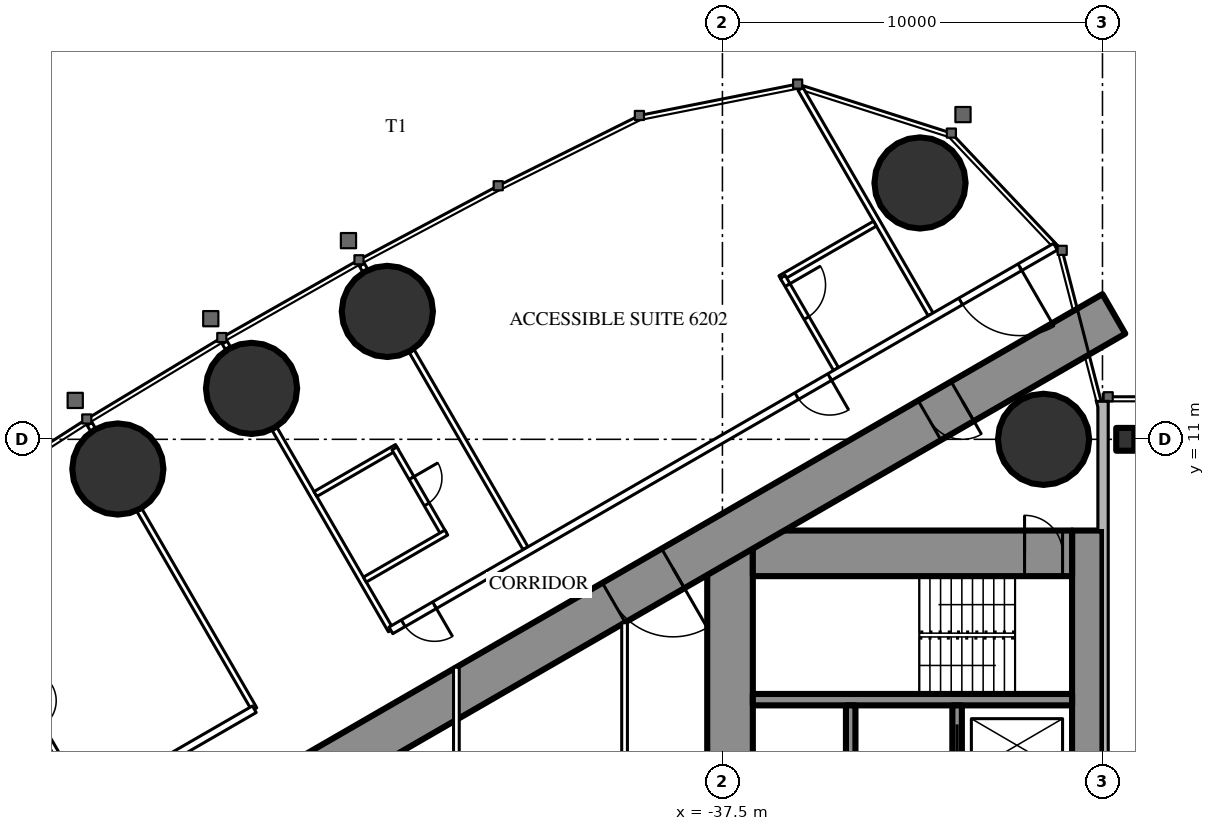
"""IFC4 building model, lengths in metres.
Left out: names, types, materials, properties, quantities, classifications, styles, units other than length and angle.
Written with IfcOpenShell. Run it as: python <this file> out.ifc"""

import sys

from ifc_helpers import new_model, si_unit, direction, frame, frame_2d, origin, origin_2d, place, context, subcontext, project, spatial, rectangle, circle, i_section, extrude, element, fill, save


model = new_model("IFC4")
c1 = context("Model", 3, precision=1e-05, world=origin(), true_north=direction((0.0, 1.0)))
c2 = subcontext(c1, "Body", "Model", "MODEL_VIEW")
j1 = project(units=[si_unit("LENGTHUNIT", "METRE"), si_unit("PLANEANGLEUNIT", "RADIAN")], contexts=[c1])
p1 = place(None, origin())
s1 = spatial("IfcSite", under=j1, at=p1, CompositionType="ELEMENT")
p2 = place(p1, origin())
s2 = spatial("IfcBuilding", under=s1, at=p2, CompositionType="ELEMENT")
p3 = place(p2, frame((0.0, 0.0, 233.3)))
s3 = spatial("IfcBuildingStorey", under=s2, at=p3, CompositionType="ELEMENT", Elevation=233.3)
for number, where, z_axis, x_axis in (
    (1, (-32.301, 17.745, 0.0), (0.0, 0.0, 1.0), (1.0, 0.0, 0.0)),
    (2, (-29.05, 11.0, 0.0), (0.0, 0.0, 1.0), (1.0, 0.0, 0.0)),
    (3, (-46.317, 14.365, 0.0), (0.0, 0.0, 1.0), (1.0, 0.0, 0.0)),
    (4, (-49.89, 12.34, 0.0), (0.0, 0.0, 1.0), (1.0, 0.0, 0.0)),
    (5, (-53.408, 10.219, 0.0), (0.0, 0.0, 1.0), (1.0, 0.0, 0.0)),
):
    element("IfcColumn", number, at=place(p3, frame(where, z_axis=z_axis, x_axis=x_axis)), inside=s3, PredefinedType="COLUMN", context=c2, shape_type="SweptSolid", body=[
        extrude(circle(Radius=1.2, at=origin_2d()), origin(), (0.0, 0.0, 1.0), 3.6),
    ])
p4 = place(p3, frame((-27.9, 8.6, 0.0), z_axis=(0.0, 0.0, 1.0), x_axis=(0.0, -1.0, 0.0)))
e6 = element("IfcWall", 6, at=p4, inside=s3, PredefinedType="SHEAR", context=c2, shape_type="SweptSolid", body=[
    extrude(rectangle(XDim=17.2, YDim=0.8, at=frame_2d((8.6, 0.0))), origin(), (0.0, 0.0, 1.0), 3.6),
])
p5 = place(p4, frame((6.95, 0.0, 0.0)))
e7 = element("IfcOpeningElement", 7, at=p5, cuts=e6, PredefinedType="OPENING", context=c2, shape_type="SweptSolid", body=[
    extrude(rectangle(XDim=0.9, YDim=2.2, at=frame_2d((0.45, 1.1))), frame((0.0, 0.41, 0.0), z_axis=(0.0, -1.0, 0.0), x_axis=(1.0, 0.0, 0.0)), (0.0, 0.0, 1.0), 0.82),
])
p6 = place(p3, frame((-37.3, 8.6, 0.0), z_axis=(0.0, 0.0, 1.0), x_axis=(0.0, -1.0, 0.0)))
e8 = element("IfcWall", 8, at=p6, inside=s3, PredefinedType="SHEAR", context=c2, shape_type="SweptSolid", body=[
    extrude(rectangle(XDim=17.2, YDim=1.2, at=frame_2d((8.6, 0.0))), origin(), (0.0, 0.0, 1.0), 3.6),
])
p7 = place(p6, frame((7.7, 0.0, 0.0)))
e9 = element("IfcOpeningElement", 9, at=p7, cuts=e8, PredefinedType="OPENING", context=c2, shape_type="SweptSolid", body=[
    extrude(rectangle(XDim=1.8, YDim=2.2, at=frame_2d((0.9, 1.1))), frame((0.0, 0.61, 0.0), z_axis=(0.0, -1.0, 0.0), x_axis=(1.0, 0.0, 0.0)), (0.0, 0.0, 1.0), 1.22),
])
p8 = place(p3, frame((-28.3, 8.0, 0.0), z_axis=(0.0, 0.0, 1.0), x_axis=(-1.0, 0.0, 0.0)))
e10 = element("IfcWall", 10, at=p8, inside=s3, PredefinedType="SHEAR", context=c2, shape_type="SweptSolid", body=[
    extrude(rectangle(XDim=8.4, YDim=1.2, at=frame_2d((4.2, 0.0))), origin(), (0.0, 0.0, 1.0), 3.6),
])
p9 = place(p8, frame((0.25, 0.0, 0.0)))
e11 = element("IfcOpeningElement", 11, at=p9, cuts=e10, PredefinedType="OPENING", context=c2, shape_type="SweptSolid", body=[
    extrude(rectangle(XDim=1.0, YDim=2.2, at=frame_2d((0.5, 1.1))), frame((0.0, 0.61, 0.0), z_axis=(0.0, -1.0, 0.0), x_axis=(1.0, 0.0, 0.0)), (0.0, 0.0, 1.0), 1.22),
])
p10 = place(p3, frame((-28.3, 4.15, 0.0), z_axis=(0.0, 0.0, 1.0), x_axis=(-1.0, 0.0, 0.0)))
e12 = element("IfcWall", 12, at=p10, inside=s3, PredefinedType="SHEAR", context=c2, shape_type="SweptSolid", body=[
    extrude(rectangle(XDim=8.4, YDim=0.3, at=frame_2d((4.2, 0.0))), origin(), (0.0, 0.0, 1.0), 3.6),
])
p11 = place(p3, frame((-31.325, 4.0, 0.0), z_axis=(0.0, 0.0, 1.0), x_axis=(0.0, -1.0, 0.0)))
e13 = element("IfcWall", 13, at=p11, inside=s3, PredefinedType="SHEAR", context=c2, shape_type="SweptSolid", body=[
    extrude(rectangle(XDim=2.1, YDim=0.25, at=frame_2d((1.05, 0.0))), origin(), (0.0, 0.0, 1.0), 3.6),
])
p12 = place(p11, frame((0.5, 0.0, 0.0)))
e14 = element("IfcOpeningElement", 14, at=p12, cuts=e13, PredefinedType="OPENING", context=c2, shape_type="SweptSolid", body=[
    extrude(rectangle(XDim=1.1, YDim=2.2, at=frame_2d((0.55, 1.1))), frame((0.0, 0.135, 0.0), z_axis=(0.0, -1.0, 0.0), x_axis=(1.0, 0.0, 0.0)), (0.0, 0.0, 1.0), 0.27),
])
p13 = place(p3, frame((-34.125, 4.0, 0.0), z_axis=(0.0, 0.0, 1.0), x_axis=(0.0, -1.0, 0.0)))
e15 = element("IfcWall", 15, at=p13, inside=s3, PredefinedType="SHEAR", context=c2, shape_type="SweptSolid", body=[
    extrude(rectangle(XDim=2.35, YDim=0.25, at=frame_2d((1.175, 0.0))), origin(), (0.0, 0.0, 1.0), 3.6),
])
p14 = place(p3, frame((-27.2, 14.3, 0.0), z_axis=(0.0, 0.0, 1.0), x_axis=(-0.866026593062, -0.499997940104, 0.0)))
e16 = element("IfcWall", 16, at=p14, inside=s3, PredefinedType="SHEAR", context=c2, shape_type="SweptSolid", body=[
    extrude(rectangle(XDim=28.946, YDim=1.2, at=frame_2d((14.473, 0.0))), origin(), (0.0, 0.0, 1.0), 3.6),
])
p15 = place(p14, frame((4.6, 0.0, 0.0)))
e17 = element("IfcOpeningElement", 17, at=p15, cuts=e16, PredefinedType="OPENING", context=c2, shape_type="SweptSolid", body=[
    extrude(rectangle(XDim=1.0, YDim=2.2, at=frame_2d((0.5, 1.1))), frame((0.0, 0.61, 0.0), z_axis=(0.0, -1.0, 0.0), x_axis=(1.0, 0.0, 0.0)), (0.0, 0.0, 1.0), 1.22),
])
p16 = place(p14, frame((13.395, 0.0, 0.0)))
e18 = element("IfcOpeningElement", 18, at=p16, cuts=e16, PredefinedType="OPENING", context=c2, shape_type="SweptSolid", body=[
    extrude(rectangle(XDim=1.8, YDim=2.2, at=frame_2d((0.9, 1.1))), frame((0.0, 0.61, 0.0), z_axis=(0.0, -1.0, 0.0), x_axis=(1.0, 0.0, 0.0)), (0.0, 0.0, 1.0), 1.22),
])
p17 = place(p3, frame((-26.9, 11.0, 0.0), z_axis=(0.0, 0.0, 1.0), x_axis=(1.0, 0.0, 0.0)))
e19 = element("IfcColumn", 19, at=p17, inside=s3, PredefinedType="COLUMN", context=c2, shape_type="SweptSolid", body=[
    extrude(i_section(OverallWidth=0.476, OverallDepth=0.6, WebThickness=0.1, FlangeThickness=0.14, FilletRadius=0.02, at=origin_2d()), origin(), (0.0, 0.0, 1.0), 3.6),
])
p18 = place(p3, frame((-32.022, 14.287, 0.0), z_axis=(0.0, 0.0, 1.0), x_axis=(-0.50000019414, 0.866025291697, 0.0)))
e20 = element("IfcWall", 20, at=p18, inside=s3, PredefinedType="PARTITIONING", context=c2, shape_type="SweptSolid", body=[
    extrude(rectangle(XDim=6.848, YDim=0.15, at=frame_2d((3.424, 0.0))), origin(), (0.0, 0.0, 1.0), 3.35),
])
p19 = place(p3, frame((-42.68, 8.134, 0.0), z_axis=(0.0, 0.0, 1.0), x_axis=(-0.499984479505, 0.866034364361, 0.0)))
e21 = element("IfcWall", 21, at=p19, inside=s3, PredefinedType="PARTITIONING", context=c2, shape_type="SweptSolid", body=[
    extrude(rectangle(XDim=5.995, YDim=0.15, at=frame_2d((2.998, 0.0))), origin(), (0.0, 0.0, 1.0), 2.45),
])
p20 = place(p3, frame((-46.898, 15.439, 0.0), z_axis=(0.0, 0.0, 1.0), x_axis=(-0.500232303069, 0.865891241997, 0.0)))
e22 = element("IfcWall", 22, at=p20, inside=s3, PredefinedType="PARTITIONING", context=c2, shape_type="SweptSolid", body=[
    extrude(rectangle(XDim=0.18, YDim=0.15, at=frame_2d((0.09, 0.0))), origin(), (0.0, 0.0, 1.0), 2.45),
])
p21 = place(p3, frame((-46.224, 5.972, 0.0), z_axis=(0.0, 0.0, 1.0), x_axis=(-0.500021351822, 0.866013075953, 0.0)))
e23 = element("IfcWall", 23, at=p21, inside=s3, PredefinedType="PARTITIONING", context=c2, shape_type="SweptSolid", body=[
    extrude(rectangle(XDim=6.128, YDim=0.15, at=frame_2d((3.064, 0.0))), origin(), (0.0, 0.0, 1.0), 2.45),
])
p22 = place(p3, frame((-50.508, 13.392, 0.0), z_axis=(0.0, 0.0, 1.0), x_axis=(-0.499644091975, 0.866230789891, 0.0)))
e24 = element("IfcWall", 24, at=p22, inside=s3, PredefinedType="PARTITIONING", context=c2, shape_type="SweptSolid", body=[
    extrude(rectangle(XDim=0.18, YDim=0.15, at=frame_2d((0.09, 0.0))), origin(), (0.0, 0.0, 1.0), 2.45),
])
p23 = place(p3, frame((-49.816, 3.898, 0.0), z_axis=(0.0, 0.0, 1.0), x_axis=(-0.500001913541, 0.866024298998, 0.0)))
e25 = element("IfcWall", 25, at=p23, inside=s3, PredefinedType="PARTITIONING", context=c2, shape_type="SweptSolid", body=[
    extrude(rectangle(XDim=6.05, YDim=0.15, at=frame_2d((3.025, 0.0))), origin(), (0.0, 0.0, 1.0), 2.45),
])
p24 = place(p3, frame((-54.061, 11.25, 0.0), z_axis=(0.0, 0.0, 1.0), x_axis=(-0.500391173478, 0.865799441849, 0.0)))
e26 = element("IfcWall", 26, at=p24, inside=s3, PredefinedType="PARTITIONING", context=c2, shape_type="SweptSolid", body=[
    extrude(rectangle(XDim=0.179, YDim=0.15, at=frame_2d((0.089, 0.0))), origin(), (0.0, 0.0, 1.0), 2.45),
])
p25 = place(p3, frame((-33.487, 16.675, 0.0), z_axis=(0.0, 0.0, 1.0), x_axis=(-0.866039941686, -0.499974818771, 0.0)))
e27 = element("IfcWall", 27, at=p25, inside=s3, PredefinedType="PARTITIONING", context=c2, shape_type="SweptSolid", body=[
    extrude(rectangle(XDim=2.875, YDim=0.15, at=frame_2d((1.438, 0.0))), origin(), (0.0, 0.0, 1.0), 3.35),
])
p26 = place(p3, frame((-34.511, 12.85, 0.0), z_axis=(0.0, 0.0, 1.0), x_axis=(-0.500011755427, 0.866018616679, 0.0)))
e28 = element("IfcWall", 28, at=p26, inside=s3, PredefinedType="PARTITIONING", context=c2, shape_type="SweptSolid", body=[
    extrude(rectangle(XDim=2.8, YDim=0.15, at=frame_2d((1.4, 0.0))), origin(), (0.0, 0.0, 1.0), 3.35),
])
p27 = place(p26, frame((1.55, 0.0, 0.0)))
e29 = element("IfcOpeningElement", 29, at=p27, cuts=e28, PredefinedType="OPENING", context=c2, shape_type="SweptSolid", body=[
    extrude(rectangle(XDim=1.0, YDim=2.2, at=frame_2d((0.5, 1.1))), frame((0.0, 0.085, 0.0), z_axis=(0.0, -1.0, 0.0), x_axis=(1.0, 0.0, 0.0)), (0.0, 0.0, 1.0), 0.17),
])
p28 = place(p3, frame((-46.065, 10.798, 0.0), z_axis=(0.0, 0.0, 1.0), x_axis=(-0.866031185235, -0.4999899861, 0.0)))
e30 = element("IfcWall", 30, at=p28, inside=s3, PredefinedType="PARTITIONING", context=c2, shape_type="SweptSolid", body=[
    extrude(rectangle(XDim=2.475, YDim=0.15, at=frame_2d((1.238, 0.0))), origin(), (0.0, 0.0, 1.0), 3.35),
])
p29 = place(p3, frame((-44.83, 8.509, 0.0), z_axis=(0.0, 0.0, 1.0), x_axis=(-0.499936506574, 0.866062058628, 0.0)))
e31 = element("IfcWall", 31, at=p29, inside=s3, PredefinedType="PARTITIONING", context=c2, shape_type="SweptSolid", body=[
    extrude(rectangle(XDim=2.6, YDim=0.15, at=frame_2d((1.3, 0.0))), origin(), (0.0, 0.0, 1.0), 3.35),
])
p30 = place(p29, frame((0.9, 0.0, 0.0)))
e32 = element("IfcOpeningElement", 32, at=p30, cuts=e31, PredefinedType="OPENING", context=c2, shape_type="SweptSolid", body=[
    extrude(rectangle(XDim=0.8, YDim=2.2, at=frame_2d((0.4, 1.1))), frame((0.0, 0.085, 0.0), z_axis=(0.0, -1.0, 0.0), x_axis=(1.0, 0.0, 0.0)), (0.0, 0.0, 1.0), 0.17),
])
p31 = place(p3, frame((-44.765, 8.546, 0.0), z_axis=(0.0, 0.0, 1.0), x_axis=(-0.86604923931, -0.499958713387, 0.0)))
e33 = element("IfcWall", 33, at=p31, inside=s3, PredefinedType="PARTITIONING", context=c2, shape_type="SweptSolid", body=[
    extrude(rectangle(XDim=2.475, YDim=0.15, at=frame_2d((1.237, 0.0))), origin(), (0.0, 0.0, 1.0), 3.35),
])
p32 = place(p3, frame((-54.98, 2.649, 0.0), z_axis=(0.0, 0.0, 1.0), x_axis=(-0.500006934395, 0.866021400173, 0.0)))
e34 = element("IfcWall", 34, at=p32, inside=s3, PredefinedType="PARTITIONING", context=c2, shape_type="SweptSolid", body=[
    extrude(rectangle(XDim=2.6, YDim=0.15, at=frame_2d((1.3, 0.0))), origin(), (0.0, 0.0, 1.0), 3.35),
])
p33 = place(p32, frame((0.9, 0.0, 0.0)))
e35 = element("IfcOpeningElement", 35, at=p33, cuts=e34, PredefinedType="OPENING", context=c2, shape_type="SweptSolid", body=[
    extrude(rectangle(XDim=0.8, YDim=2.2, at=frame_2d((0.4, 1.1))), frame((0.0, 0.085, 0.0), z_axis=(0.0, -1.0, 0.0), x_axis=(1.0, 0.0, 0.0)), (0.0, 0.0, 1.0), 0.17),
])
p34 = place(p3, frame((-28.737, 16.068, 0.0), z_axis=(0.0, 0.0, 1.0), x_axis=(-0.866023901326, -0.500002602325, 0.0)))
e36 = element("IfcWall", 36, at=p34, inside=s3, PredefinedType="PARTITIONING", context=c2, shape_type="SweptSolid", body=[
    extrude(rectangle(XDim=20.192, YDim=0.2, at=frame_2d((10.096, 0.0))), origin(), (0.0, 0.0, 1.0), 3.35),
])
p35 = place(p34, frame((1.08, 0.0, 0.0)))
e37 = element("IfcOpeningElement", 37, at=p35, cuts=e36, PredefinedType="OPENING", context=c2, shape_type="SweptSolid", body=[
    extrude(rectangle(XDim=1.8, YDim=2.03, at=frame_2d((0.9, 1.015))), frame((0.0, 0.11, 0.0), z_axis=(0.0, -1.0, 0.0), x_axis=(1.0, 0.0, 0.0)), (0.0, 0.0, 1.0), 0.22),
])
p36 = place(p34, frame((6.86, 0.0, 0.0)))
e38 = element("IfcOpeningElement", 38, at=p36, cuts=e36, PredefinedType="OPENING", context=c2, shape_type="SweptSolid", body=[
    extrude(rectangle(XDim=1.0, YDim=2.2, at=frame_2d((0.5, 1.1))), frame((0.0, 0.11, 0.0), z_axis=(0.0, -1.0, 0.0), x_axis=(1.0, 0.0, 0.0)), (0.0, 0.0, 1.0), 0.22),
])
p37 = place(p34, frame((18.867, 0.0, 0.0)))
e39 = element("IfcOpeningElement", 39, at=p37, cuts=e36, PredefinedType="OPENING", context=c2, shape_type="SweptSolid", body=[
    extrude(rectangle(XDim=0.95, YDim=2.2, at=frame_2d((0.475, 1.1))), frame((0.0, 0.11, 0.0), z_axis=(0.0, -1.0, 0.0), x_axis=(1.0, 0.0, 0.0)), (0.0, 0.0, 1.0), 0.22),
])
p38 = place(p3, frame((-49.816, 3.898, 0.0), z_axis=(0.0, 0.0, 1.0), x_axis=(-0.866028102716, -0.499995325284, 0.0)))
e40 = element("IfcWall", 40, at=p38, inside=s3, PredefinedType="PARTITIONING", context=c2, shape_type="SweptSolid", body=[
    extrude(rectangle(XDim=7.796, YDim=0.2, at=frame_2d((3.898, 0.0))), origin(), (0.0, 0.0, 1.0), 3.35),
])
p39 = place(p38, frame((6.246, 0.0, 0.0)))
e41 = element("IfcOpeningElement", 41, at=p39, cuts=e40, PredefinedType="OPENING", context=c2, shape_type="SweptSolid", body=[
    extrude(rectangle(XDim=0.95, YDim=2.2, at=frame_2d((0.475, 1.1))), frame((0.0, 0.11, 0.0), z_axis=(0.0, -1.0, 0.0), x_axis=(1.0, 0.0, 0.0)), (0.0, 0.0, 1.0), 0.22),
])
p40 = place(p3, frame((-40.075, 6.174, 0.0), z_axis=(0.0, 0.0, 1.0), x_axis=(0.0, -1.0, 0.0)))
e42 = element("IfcWall", 42, at=p40, inside=s3, PredefinedType="PARTITIONING", context=c2, shape_type="SweptSolid", body=[
    extrude(rectangle(XDim=12.348, YDim=0.15, at=frame_2d((6.174, 0.0))), origin(), (0.0, 0.0, 1.0), 3.35),
])
p41 = place(p40, frame((5.274, 0.0, 0.0)))
e43 = element("IfcOpeningElement", 43, at=p41, cuts=e42, PredefinedType="OPENING", context=c2, shape_type="SweptSolid", body=[
    extrude(rectangle(XDim=1.8, YDim=2.2, at=frame_2d((0.9, 1.1))), frame((0.0, 0.085, 0.0), z_axis=(0.0, -1.0, 0.0), x_axis=(1.0, 0.0, 0.0)), (0.0, 0.0, 1.0), 0.17),
])
p42 = place(p3, frame((-44.5, 5.005, 0.0), z_axis=(0.0, 0.0, 1.0), x_axis=(0.0, -1.0, 0.0)))
e44 = element("IfcWall", 44, at=p42, inside=s3, PredefinedType="PARTITIONING", context=c2, shape_type="SweptSolid", body=[
    extrude(rectangle(XDim=10.009, YDim=0.15, at=frame_2d((5.005, 0.0))), origin(), (0.0, 0.0, 1.0), 2.5),
])
p43 = place(p42, frame((4.505, 0.0, 0.0)))
e45 = element("IfcOpeningElement", 45, at=p43, cuts=e44, PredefinedType="OPENING", context=c2, shape_type="SweptSolid", body=[
    extrude(rectangle(XDim=1.0, YDim=2.2, at=frame_2d((0.5, 1.1))), frame((0.0, 0.085, 0.0), z_axis=(0.0, -1.0, 0.0), x_axis=(1.0, 0.0, 0.0)), (0.0, 0.0, 1.0), 0.17),
])
p44 = place(p35, origin())
e46 = element("IfcDoor", 46, at=p44, inside=s3, OperationType="DOUBLE_DOOR_SINGLE_SWING", PredefinedType="DOOR", context=c2, shape_type="SweptSolid", body=[
    extrude(rectangle(XDim=1.8, YDim=2.03, at=frame_2d((0.9, 1.015))), frame((0.0, 0.025, 0.0), z_axis=(0.0, -1.0, 0.0), x_axis=(1.0, 0.0, 0.0)), (0.0, 0.0, 1.0), 0.05),
])
fill(e37, e46)
p45 = place(p27, origin())
e47 = element("IfcDoor", 47, at=p45, inside=s3, OperationType="SINGLE_SWING_RIGHT", PredefinedType="DOOR", context=c2, shape_type="SweptSolid", body=[
    extrude(rectangle(XDim=1.0, YDim=2.2, at=frame_2d((0.5, 1.1))), frame((0.0, 0.025, 0.0), z_axis=(0.0, -1.0, 0.0), x_axis=(1.0, 0.0, 0.0)), (0.0, 0.0, 1.0), 0.05),
])
fill(e29, e47)
p46 = place(p36, origin())
e48 = element("IfcDoor", 48, at=p46, inside=s3, OperationType="SINGLE_SWING_LEFT", PredefinedType="DOOR", context=c2, shape_type="SweptSolid", body=[
    extrude(rectangle(XDim=1.0, YDim=2.2, at=frame_2d((0.5, 1.1))), frame((0.0, 0.025, 0.0), z_axis=(0.0, -1.0, 0.0), x_axis=(1.0, 0.0, 0.0)), (0.0, 0.0, 1.0), 0.05),
])
fill(e38, e48)
p47 = place(p30, origin())
e49 = element("IfcDoor", 49, at=p47, inside=s3, OperationType="SINGLE_SWING_RIGHT", PredefinedType="DOOR", context=c2, shape_type="SweptSolid", body=[
    extrude(rectangle(XDim=0.8, YDim=2.2, at=frame_2d((0.4, 1.1))), frame((0.0, 0.025, 0.0), z_axis=(0.0, -1.0, 0.0), x_axis=(1.0, 0.0, 0.0)), (0.0, 0.0, 1.0), 0.05),
])
fill(e32, e49)
p48 = place(p37, origin())
e50 = element("IfcDoor", 50, at=p48, inside=s3, OperationType="SINGLE_SWING_LEFT", PredefinedType="DOOR", context=c2, shape_type="SweptSolid", body=[
    extrude(rectangle(XDim=0.95, YDim=2.2, at=frame_2d((0.475, 1.1))), frame((0.0, 0.025, 0.0), z_axis=(0.0, -1.0, 0.0), x_axis=(1.0, 0.0, 0.0)), (0.0, 0.0, 1.0), 0.05),
])
fill(e39, e50)
p49 = place(p15, origin())
e51 = element("IfcDoor", 51, at=p49, inside=s3, OperationType="SINGLE_SWING_LEFT", PredefinedType="DOOR", context=c2, shape_type="SweptSolid", body=[
    extrude(rectangle(XDim=1.0, YDim=2.2, at=frame_2d((0.5, 1.1))), frame((0.0, 0.025, 0.0), z_axis=(0.0, -1.0, 0.0), x_axis=(1.0, 0.0, 0.0)), (0.0, 0.0, 1.0), 0.05),
])
fill(e17, e51)
p50 = place(p16, origin())
e52 = element("IfcDoor", 52, at=p50, inside=s3, OperationType="DOUBLE_DOOR_SINGLE_SWING", PredefinedType="DOOR", context=c2, shape_type="SweptSolid", body=[
    extrude(rectangle(XDim=1.8, YDim=2.2, at=frame_2d((0.9, 1.1))), frame((0.0, 0.025, 0.0), z_axis=(0.0, -1.0, 0.0), x_axis=(1.0, 0.0, 0.0)), (0.0, 0.0, 1.0), 0.05),
])
fill(e18, e52)
p51 = place(p9, origin())
e53 = element("IfcDoor", 53, at=p51, inside=s3, OperationType="SINGLE_SWING_RIGHT", PredefinedType="DOOR", context=c2, shape_type="SweptSolid", body=[
    extrude(rectangle(XDim=1.0, YDim=2.2, at=frame_2d((0.5, 1.1))), frame((0.0, 0.025, 0.0), z_axis=(0.0, -1.0, 0.0), x_axis=(1.0, 0.0, 0.0)), (0.0, 0.0, 1.0), 0.05),
])
fill(e11, e53)
p52 = place(p12, origin())
e54 = element("IfcDoor", 54, at=p52, inside=s3, OperationType="SLIDING_TO_LEFT", PredefinedType="USERDEFINED", context=c2, shape_type="SweptSolid", body=[
    extrude(rectangle(XDim=1.1, YDim=2.2, at=frame_2d((0.55, 1.1))), frame((0.0, 0.025, 0.0), z_axis=(0.0, -1.0, 0.0), x_axis=(1.0, 0.0, 0.0)), (0.0, 0.0, 1.0), 0.05),
])
fill(e14, e54)
save(model, sys.argv[1])
